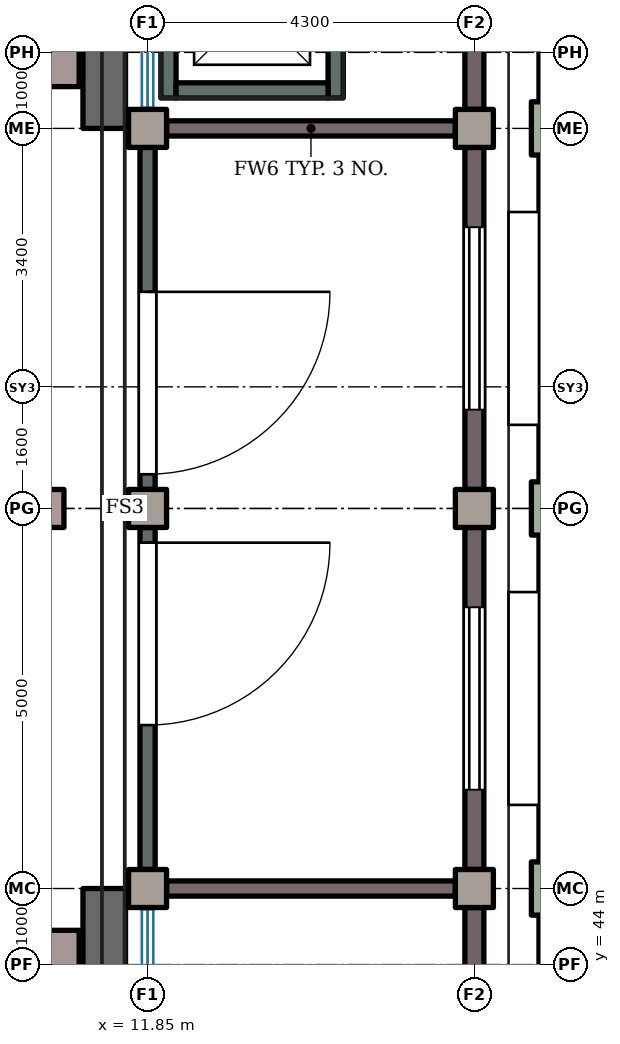
"""IFC4 building model, lengths in metres.
Left out: names, types, materials, properties, quantities, classifications, styles, units other than length and angle.
Written with IfcOpenShell. Run it as: python <this file> out.ifc"""

import sys

from ifc_helpers import new_model, si_unit, direction, frame, frame_2d, origin, origin_2d, place, context, subcontext, project, spatial, rectangle, extrude, element, fill, save


model = new_model("IFC4")
c1 = context("Model", 3, precision=1e-05, world=origin(), true_north=direction((0.0, 1.0)))
c2 = subcontext(c1, "Body", "Model", "MODEL_VIEW")
j1 = project(units=[si_unit("LENGTHUNIT", "METRE"), si_unit("PLANEANGLEUNIT", "RADIAN")], contexts=[c1])
p1 = place(None, origin())
s1 = spatial("IfcSite", under=j1, at=p1, CompositionType="ELEMENT")
p2 = place(p1, origin())
s2 = spatial("IfcBuilding", under=s1, at=p2, CompositionType="ELEMENT")
p3 = place(p2, origin())
s3 = spatial("IfcBuildingStorey", under=s2, at=p3, CompositionType="ELEMENT", Elevation=0.0)
for number, where, z_axis, x_axis in (
    (1, (17.25, 45.0, 0.0), (0.0, 0.0, 1.0), (1.0, 0.0, 0.0)),
    (2, (17.25, 50.0, 0.0), (0.0, 0.0, 1.0), (1.0, 0.0, 0.0)),
    (3, (17.25, 55.0, 0.0), (0.0, 0.0, 1.0), (1.0, 0.0, 0.0)),
):
    element("IfcColumn", number, at=place(p3, frame(where, z_axis=z_axis, x_axis=x_axis)), inside=s3, PredefinedType="COLUMN", context=c2, shape_type="SweptSolid", body=[
        extrude(rectangle(XDim=0.7, YDim=0.7, at=origin_2d()), origin(), (0.0, 0.0, 1.0), 4.2),
    ])
p4 = place(p3, frame((17.25, 59.649, 0.0), z_axis=(0.0, 0.0, 1.0), x_axis=(0.0, -1.0, 0.0)))
e4 = element("IfcWall", 4, at=p4, inside=s3, PredefinedType="SHEAR", context=c2, shape_type="SweptSolid", body=[
    extrude(rectangle(XDim=4.299, YDim=0.5, at=frame_2d((2.149, 0.0))), origin(), (0.0, 0.0, 1.0), 3.4),
])
p5 = place(p3, frame((17.25, 54.649, 0.0), z_axis=(0.0, 0.0, 1.0), x_axis=(0.0, -1.0, 0.0)))
e5 = element("IfcWall", 5, at=p5, inside=s3, PredefinedType="SHEAR", context=c2, shape_type="SweptSolid", body=[
    extrude(rectangle(XDim=4.299, YDim=0.5, at=frame_2d((2.149, 0.0))), origin(), (0.0, 0.0, 1.0), 3.4),
])
p6 = place(p5, frame((0.949, 0.0, 0.0)))
e6 = element("IfcOpeningElement", 6, at=p6, cuts=e5, PredefinedType="OPENING", context=c2, shape_type="SweptSolid", body=[
    extrude(rectangle(XDim=2.4, YDim=3.2, at=frame_2d((1.2, 1.6))), frame((0.0, 0.26, 0.0), z_axis=(0.0, -1.0, 0.0), x_axis=(1.0, 0.0, 0.0)), (0.0, 0.0, 1.0), 0.52),
])
p7 = place(p3, frame((17.25, 49.649, 0.0), z_axis=(0.0, 0.0, 1.0), x_axis=(0.0, -1.0, 0.0)))
e7 = element("IfcWall", 7, at=p7, inside=s3, PredefinedType="SHEAR", context=c2, shape_type="SweptSolid", body=[
    extrude(rectangle(XDim=4.299, YDim=0.5, at=frame_2d((2.149, 0.0))), origin(), (0.0, 0.0, 1.0), 3.4),
])
p8 = place(p7, frame((0.949, 0.0, 0.0)))
e8 = element("IfcOpeningElement", 8, at=p8, cuts=e7, PredefinedType="OPENING", context=c2, shape_type="SweptSolid", body=[
    extrude(rectangle(XDim=2.4, YDim=3.2, at=frame_2d((1.2, 1.6))), frame((0.0, 0.26, 0.0), z_axis=(0.0, -1.0, 0.0), x_axis=(1.0, 0.0, 0.0)), (0.0, 0.0, 1.0), 0.52),
])
p9 = place(p3, frame((17.25, 44.649, 0.0), z_axis=(0.0, 0.0, 1.0), x_axis=(0.0, -1.0, 0.0)))
e9 = element("IfcWall", 9, at=p9, inside=s3, PredefinedType="SHEAR", context=c2, shape_type="SweptSolid", body=[
    extrude(rectangle(XDim=4.299, YDim=0.5, at=frame_2d((2.149, 0.0))), origin(), (0.0, 0.0, 1.0), 3.4),
])
for number, where, z_axis, x_axis in (
    (10, (16.15, 55.0, 0.0), (0.0, 0.0, 1.0), (1.0, 0.0, 0.0)),
    (11, (16.15, 50.0, 0.0), (0.0, 0.0, 1.0), (1.0, 0.0, 0.0)),
    (12, (16.15, 45.0, 0.0), (0.0, 0.0, 1.0), (1.0, 0.0, 0.0)),
    (13, (11.85, 55.0, 0.0), (0.0, 0.0, 1.0), (1.0, 0.0, 0.0)),
    (14, (11.85, 50.0, 0.0), (0.0, 0.0, 1.0), (1.0, 0.0, 0.0)),
    (15, (11.85, 45.0, 0.0), (0.0, 0.0, 1.0), (1.0, 0.0, 0.0)),
):
    element("IfcColumn", number, at=place(p3, frame(where, z_axis=z_axis, x_axis=x_axis)), inside=s3, PredefinedType="COLUMN", context=c2, shape_type="SweptSolid", body=[
        extrude(rectangle(XDim=0.5, YDim=0.5, at=origin_2d()), origin(), (0.0, 0.0, 1.0), 4.2),
    ])
p10 = place(p3, frame((16.15, 59.75, 0.0), z_axis=(0.0, 0.0, 1.0), x_axis=(0.0, -1.0, 0.0)))
e16 = element("IfcWall", 16, at=p10, inside=s3, PredefinedType="SHEAR", context=c2, shape_type="SweptSolid", body=[
    extrude(rectangle(XDim=4.499, YDim=0.25, at=frame_2d((2.25, 0.0))), origin(), (0.0, 0.0, 1.0), 3.6),
])
p11 = place(p3, frame((16.15, 54.75, 0.0), z_axis=(0.0, 0.0, 1.0), x_axis=(0.0, -1.0, 0.0)))
e17 = element("IfcWall", 17, at=p11, inside=s3, PredefinedType="SHEAR", context=c2, shape_type="SweptSolid", body=[
    extrude(rectangle(XDim=4.499, YDim=0.25, at=frame_2d((2.25, 0.0))), origin(), (0.0, 0.0, 1.0), 3.6),
])
p12 = place(p11, frame((1.05, 0.0, 0.0)))
e18 = element("IfcOpeningElement", 18, at=p12, cuts=e17, PredefinedType="OPENING", context=c2, shape_type="SweptSolid", body=[
    extrude(rectangle(XDim=2.4, YDim=2.6, at=frame_2d((1.2, 1.3))), frame((0.0, 0.135, 0.0), z_axis=(0.0, -1.0, 0.0), x_axis=(1.0, 0.0, 0.0)), (0.0, 0.0, 1.0), 0.27),
])
p13 = place(p3, frame((16.15, 49.75, 0.0), z_axis=(0.0, 0.0, 1.0), x_axis=(0.0, -1.0, 0.0)))
e19 = element("IfcWall", 19, at=p13, inside=s3, PredefinedType="SHEAR", context=c2, shape_type="SweptSolid", body=[
    extrude(rectangle(XDim=4.499, YDim=0.25, at=frame_2d((2.25, 0.0))), origin(), (0.0, 0.0, 1.0), 3.6),
])
p14 = place(p13, frame((1.05, 0.0, 0.0)))
e20 = element("IfcOpeningElement", 20, at=p14, cuts=e19, PredefinedType="OPENING", context=c2, shape_type="SweptSolid", body=[
    extrude(rectangle(XDim=2.4, YDim=2.6, at=frame_2d((1.2, 1.3))), frame((0.0, 0.135, 0.0), z_axis=(0.0, -1.0, 0.0), x_axis=(1.0, 0.0, 0.0)), (0.0, 0.0, 1.0), 0.27),
])
p15 = place(p3, frame((16.15, 44.75, 0.0), z_axis=(0.0, 0.0, 1.0), x_axis=(0.0, -1.0, 0.0)))
e21 = element("IfcWall", 21, at=p15, inside=s3, PredefinedType="SHEAR", context=c2, shape_type="SweptSolid", body=[
    extrude(rectangle(XDim=4.499, YDim=0.25, at=frame_2d((2.25, 0.0))), origin(), (0.0, 0.0, 1.0), 3.6),
])
p16 = place(p3, frame((10.5, 50.0, 0.0), z_axis=(0.0, 0.0, 1.0), x_axis=(1.0, 0.0, 0.0)))
e22 = element("IfcColumn", 22, at=p16, inside=s3, PredefinedType="COLUMN", context=c2, shape_type="SweptSolid", body=[
    extrude(rectangle(XDim=0.5, YDim=0.5, at=origin_2d()), origin(), (0.0, 0.0, 1.0), 3.95),
])
for number, where, z_axis, x_axis in (
    (23, (10.5, 44.0, 0.0), (0.0, 0.0, 1.0), (1.0, 0.0, 0.0)),
    (24, (10.5, 56.0, 0.0), (0.0, 0.0, 1.0), (1.0, 0.0, 0.0)),
):
    element("IfcColumn", number, at=place(p3, frame(where, z_axis=z_axis, x_axis=x_axis)), inside=s3, PredefinedType="COLUMN", context=c2, shape_type="SweptSolid", body=[
        extrude(rectangle(XDim=0.9, YDim=0.9, at=origin_2d()), origin(), (0.0, 0.0, 1.0), 4.2),
    ])
p17 = place(p3, frame((11.85, 54.75, 0.0), z_axis=(0.0, 0.0, 1.0), x_axis=(0.0, -1.0, 0.0)))
e25 = element("IfcWall", 25, at=p17, inside=s3, PredefinedType="STANDARD", context=c2, shape_type="SweptSolid", body=[
    extrude(rectangle(XDim=4.499, YDim=0.2, at=frame_2d((2.25, 0.0))), origin(), (0.0, 0.0, 1.0), 3.5),
])
p18 = place(p17, frame((1.899, 0.0, 0.0)))
e26 = element("IfcOpeningElement", 26, at=p18, cuts=e25, PredefinedType="OPENING", context=c2, shape_type="SweptSolid", body=[
    extrude(rectangle(XDim=2.4, YDim=2.6, at=frame_2d((1.2, 1.3))), frame((0.0, 0.11, 0.0), z_axis=(0.0, -1.0, 0.0), x_axis=(1.0, 0.0, 0.0)), (0.0, 0.0, 1.0), 0.22),
])
p19 = place(p3, frame((11.85, 49.75, 0.0), z_axis=(0.0, 0.0, 1.0), x_axis=(0.0, -1.0, 0.0)))
e27 = element("IfcWall", 27, at=p19, inside=s3, PredefinedType="STANDARD", context=c2, shape_type="SweptSolid", body=[
    extrude(rectangle(XDim=4.499, YDim=0.2, at=frame_2d((2.25, 0.0))), origin(), (0.0, 0.0, 1.0), 3.5),
])
p20 = place(p19, frame((0.199, 0.0, 0.0)))
e28 = element("IfcOpeningElement", 28, at=p20, cuts=e27, PredefinedType="OPENING", context=c2, shape_type="SweptSolid", body=[
    extrude(rectangle(XDim=2.4, YDim=2.6, at=frame_2d((1.2, 1.3))), frame((0.0, 0.11, 0.0), z_axis=(0.0, -1.0, 0.0), x_axis=(1.0, 0.0, 0.0)), (0.0, 0.0, 1.0), 0.22),
])
for number, where, z_axis, x_axis in (
    (29, (11.28, 60.0, 0.0), (0.0, 0.0, 1.0), (0.0, -1.0, 0.0)),
    (30, (11.28, 45.0, 0.0), (0.0, 0.0, 1.0), (0.0, -1.0, 0.0)),
):
    element("IfcWall", number, at=place(p3, frame(where, z_axis=z_axis, x_axis=x_axis)), inside=s3, PredefinedType="STANDARD", context=c2, shape_type="SweptSolid", body=[
        extrude(rectangle(XDim=5.0, YDim=0.56, at=frame_2d((2.5, 0.0))), origin(), (0.0, 0.0, 1.0), 0.3),
    ])
for number, where, z_axis, x_axis in (
    (31, (15.9, 55.0, 0.0), (0.0, 0.0, 1.0), (-1.0, 0.0, 0.0)),
    (32, (15.9, 45.0, 0.0), (0.0, 0.0, 1.0), (-1.0, 0.0, 0.0)),
):
    element("IfcWall", number, at=place(p3, frame(where, z_axis=z_axis, x_axis=x_axis)), inside=s3, PredefinedType="STANDARD", context=c2, shape_type="SweptSolid", body=[
        extrude(rectangle(XDim=3.8, YDim=0.2, at=frame_2d((1.9, 0.0))), origin(), (0.0, 0.0, 1.0), 4.0),
    ])
p21 = place(p3, frame((14.325, 57.8, -0.75), z_axis=(0.0, 0.0, 1.0), x_axis=(0.0, -1.0, 0.0)))
e33 = element("IfcWall", 33, at=p21, inside=s3, PredefinedType="SHEAR", context=c2, shape_type="SweptSolid", body=[
    extrude(rectangle(XDim=2.4, YDim=0.2, at=frame_2d((1.2, 0.0))), origin(), (0.0, 0.0, 1.0), 4.95),
])
p22 = place(p21, frame((0.7, 0.0, 0.75)))
e34 = element("IfcOpeningElement", 34, at=p22, cuts=e33, PredefinedType="OPENING", context=c2, shape_type="SweptSolid", body=[
    extrude(rectangle(XDim=1.0, YDim=2.1, at=frame_2d((0.5, 1.05))), frame((0.0, 0.11, 0.0), z_axis=(0.0, -1.0, 0.0), x_axis=(1.0, 0.0, 0.0)), (0.0, 0.0, 1.0), 0.22),
])
p23 = place(p3, frame((12.125, 57.8, -0.75), z_axis=(0.0, 0.0, 1.0), x_axis=(0.0, -1.0, 0.0)))
e35 = element("IfcWall", 35, at=p23, inside=s3, PredefinedType="SHEAR", context=c2, shape_type="SweptSolid", body=[
    extrude(rectangle(XDim=2.4, YDim=0.2, at=frame_2d((1.2, 0.0))), origin(), (0.0, 0.0, 1.0), 4.95),
])
p24 = place(p3, frame((14.225, 55.5, -0.75), z_axis=(0.0, 0.0, 1.0), x_axis=(-1.0, 0.0, 0.0)))
e36 = element("IfcWall", 36, at=p24, inside=s3, PredefinedType="SHEAR", context=c2, shape_type="SweptSolid", body=[
    extrude(rectangle(XDim=2.0, YDim=0.2, at=frame_2d((1.0, 0.0))), origin(), (0.0, 0.0, 1.0), 4.95),
])
p25 = place(p18, origin())
e37 = element("IfcDoor", 37, at=p25, inside=s3, OperationType="DOUBLE_DOOR_DOUBLE_SWING", PredefinedType="DOOR", context=c2, shape_type="SweptSolid", body=[
    extrude(rectangle(XDim=2.4, YDim=2.6, at=frame_2d((1.2, 1.3))), frame((0.0, 0.025, 0.0), z_axis=(0.0, -1.0, 0.0), x_axis=(1.0, 0.0, 0.0)), (0.0, 0.0, 1.0), 0.05),
])
fill(e26, e37)
p26 = place(p20, origin())
e38 = element("IfcDoor", 38, at=p26, inside=s3, OperationType="DOUBLE_DOOR_DOUBLE_SWING", PredefinedType="DOOR", context=c2, shape_type="SweptSolid", body=[
    extrude(rectangle(XDim=2.4, YDim=2.6, at=frame_2d((1.2, 1.3))), frame((0.0, 0.025, 0.0), z_axis=(0.0, -1.0, 0.0), x_axis=(1.0, 0.0, 0.0)), (0.0, 0.0, 1.0), 0.05),
])
fill(e28, e38)
p27 = place(p12, origin())
e39 = element("IfcDoor", 39, at=p27, inside=s3, OperationType="DOUBLE_DOOR_SLIDING", PredefinedType="DOOR", context=c2, shape_type="SweptSolid", body=[
    extrude(rectangle(XDim=2.4, YDim=2.6, at=frame_2d((1.2, 1.3))), frame((0.0, 0.025, 0.0), z_axis=(0.0, -1.0, 0.0), x_axis=(1.0, 0.0, 0.0)), (0.0, 0.0, 1.0), 0.05),
])
fill(e18, e39)
p28 = place(p14, origin())
e40 = element("IfcDoor", 40, at=p28, inside=s3, OperationType="DOUBLE_DOOR_SLIDING", PredefinedType="DOOR", context=c2, shape_type="SweptSolid", body=[
    extrude(rectangle(XDim=2.4, YDim=2.6, at=frame_2d((1.2, 1.3))), frame((0.0, 0.025, 0.0), z_axis=(0.0, -1.0, 0.0), x_axis=(1.0, 0.0, 0.0)), (0.0, 0.0, 1.0), 0.05),
])
fill(e20, e40)
save(model, sys.argv[1])
